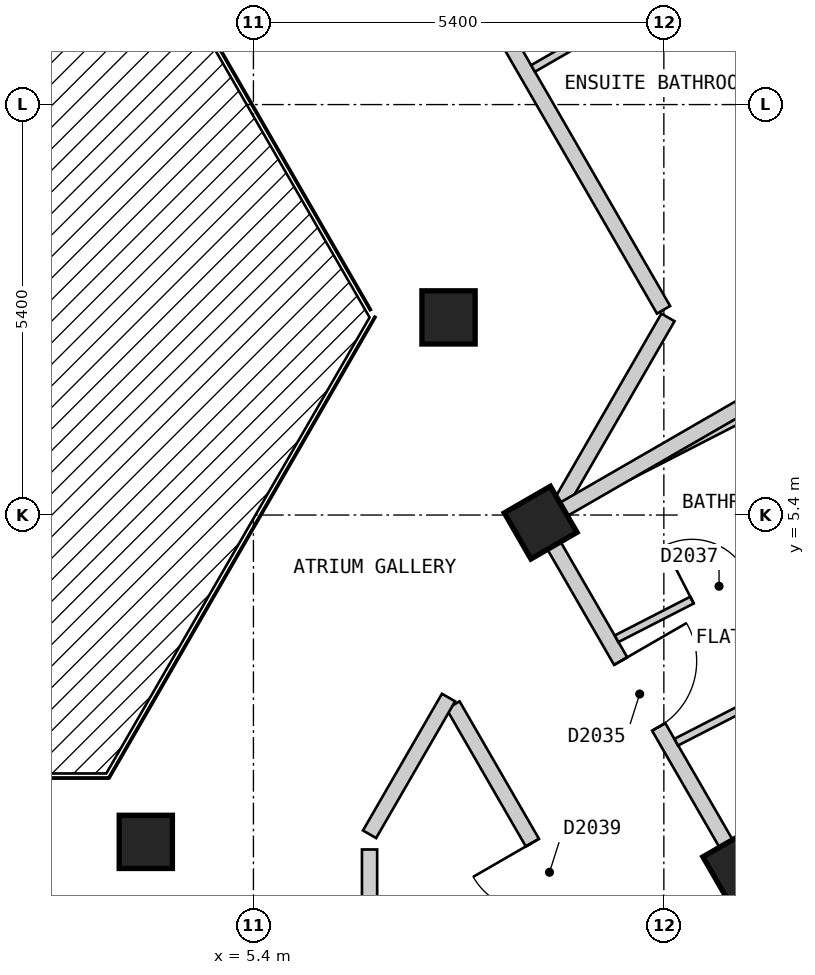
"""IFC4 building model, lengths in metres.
Left out: names, types, materials, properties, quantities, classifications, styles, units other than length and angle.
Written with IfcOpenShell. Run it as: python <this file> out.ifc"""

import sys

from ifc_helpers import new_model, si_unit, direction, frame, frame_2d, origin, origin_2d, place, context, subcontext, project, spatial, rectangle, extrude, element, fill, save


model = new_model("IFC4")
c1 = context("Model", 3, precision=1e-05, world=origin(), true_north=direction((0.0, 1.0)))
c2 = subcontext(c1, "Body", "Model", "MODEL_VIEW")
j1 = project(units=[si_unit("LENGTHUNIT", "METRE"), si_unit("PLANEANGLEUNIT", "RADIAN")], contexts=[c1])
p1 = place(None, origin())
s1 = spatial("IfcSite", under=j1, at=p1, CompositionType="ELEMENT")
p2 = place(p1, origin())
s2 = spatial("IfcBuilding", under=s1, at=p2, CompositionType="ELEMENT")
p3 = place(p2, frame((0.0, 0.0, 238.8)))
s3 = spatial("IfcBuildingStorey", under=s2, at=p3, CompositionType="ELEMENT", Elevation=238.8)
for number, where, z_axis, x_axis in (
    (1, (11.792, 0.775, 0.0), (0.0, 0.0, 1.0), (-0.5, 0.866, 0.0)),
    (2, (3.984, 1.1, 0.0), (0.0, 0.0, 1.0), (1.0, 0.0, 0.0)),
    (3, (9.179, 5.3, 0.0), (0.0, 0.0, 1.0), (-0.5, 0.866, 0.0)),
    (4, (7.967, 8.0, 0.0), (0.0, 0.0, 1.0), (1.0, 0.0, 0.0)),
):
    element("IfcColumn", number, at=place(p3, frame(where, z_axis=z_axis, x_axis=x_axis)), inside=s3, PredefinedType="COLUMN", context=c2, shape_type="SweptSolid", body=[
        extrude(rectangle(XDim=0.7, YDim=0.7, at=origin_2d()), origin(), (0.0, 0.0, 1.0), 3.0),
    ])
p4 = place(p3, frame((8.026, 2.899, 0.0), z_axis=(0.0, 0.0, 1.0), x_axis=(0.499986018985, -0.866033475577, 0.0)))
e5 = element("IfcWall", 5, at=p4, inside=s3, PredefinedType="PARTITIONING", context=c2, shape_type="SweptSolid", body=[
    extrude(rectangle(XDim=5.078, YDim=0.2, at=frame_2d((2.539, 0.0))), origin(), (0.0, 0.0, 1.0), 2.7),
])
p5 = place(p4, frame((2.089, 0.0, 0.0)))
e6 = element("IfcOpeningElement", 6, at=p5, cuts=e5, PredefinedType="OPENING", context=c2, shape_type="SweptSolid", body=[
    extrude(rectangle(XDim=0.9, YDim=2.1, at=frame_2d((0.45, 1.05))), frame((0.0, 0.11, 0.0), z_axis=(0.0, -1.0, 0.0), x_axis=(1.0, 0.0, 0.0)), (0.0, 0.0, 1.0), 0.22),
])
p6 = place(p3, frame((9.238, 5.2, 0.0), z_axis=(0.0, 0.0, 1.0), x_axis=(0.500025705601, -0.86601056214, 0.0)))
e7 = element("IfcWall", 7, at=p6, inside=s3, PredefinedType="PARTITIONING", context=c2, shape_type="SweptSolid", body=[
    extrude(rectangle(XDim=7.735, YDim=0.2, at=frame_2d((3.868, 0.0))), origin(), (0.0, 0.0, 1.0), 2.7),
])
p7 = place(p6, frame((6.705, 0.0, 0.0)))
e8 = element("IfcOpeningElement", 8, at=p7, cuts=e7, PredefinedType="OPENING", context=c2, shape_type="SweptSolid", body=[
    extrude(rectangle(XDim=1.0, YDim=2.1, at=frame_2d((0.5, 1.05))), frame((0.0, 0.11, 0.0), z_axis=(0.0, -1.0, 0.0), x_axis=(1.0, 0.0, 0.0)), (0.0, 0.0, 1.0), 0.22),
])
p8 = place(p6, frame((1.988, 0.0, 0.0)))
e9 = element("IfcOpeningElement", 9, at=p8, cuts=e7, PredefinedType="OPENING", context=c2, shape_type="SweptSolid", body=[
    extrude(rectangle(XDim=1.0, YDim=2.1, at=frame_2d((0.5, 1.05))), frame((0.0, 0.11, 0.0), z_axis=(0.0, -1.0, 0.0), x_axis=(1.0, 0.0, 0.0)), (0.0, 0.0, 1.0), 0.22),
])
p9 = place(p3, frame((5.485, 17.3, 0.0), z_axis=(0.0, 0.0, 1.0), x_axis=(0.499943285704, -0.866058145322, 0.0)))
e10 = element("IfcWall", 10, at=p9, inside=s3, PredefinedType="PARTITIONING", context=c2, shape_type="SweptSolid", body=[
    extrude(rectangle(XDim=10.623, YDim=0.2, at=frame_2d((5.312, 0.0))), origin(), (0.0, 0.0, 1.0), 2.7),
])
p10 = place(p3, frame((6.928, 1.0, 0.0), z_axis=(0.0, 0.0, 1.0), x_axis=(0.0, -1.0, 0.0)))
e11 = element("IfcWall", 11, at=p10, inside=s3, PredefinedType="PARTITIONING", context=c2, shape_type="SweptSolid", body=[
    extrude(rectangle(XDim=3.699, YDim=0.2, at=frame_2d((1.85, 0.0))), origin(), (0.0, 0.0, 1.0), 2.7),
])
p11 = place(p3, frame((6.928, 1.2, 0.0), z_axis=(0.0, 0.0, 1.0), x_axis=(0.500132712588, 0.865948768577, 0.0)))
e12 = element("IfcWall", 12, at=p11, inside=s3, PredefinedType="PARTITIONING", context=c2, shape_type="SweptSolid", body=[
    extrude(rectangle(XDim=2.078, YDim=0.2, at=frame_2d((1.039, 0.0))), origin(), (0.0, 0.0, 1.0), 2.7),
])
p12 = place(p3, frame((9.454, 5.574, 0.0), z_axis=(0.0, 0.0, 1.0), x_axis=(0.499795394297, 0.86614350072, 0.0)))
e13 = element("IfcWall", 13, at=p12, inside=s3, PredefinedType="PARTITIONING", context=c2, shape_type="SweptSolid", body=[
    extrude(rectangle(XDim=2.801, YDim=0.2, at=frame_2d((1.4, 0.0))), origin(), (0.0, 0.0, 1.0), 2.7),
])
p13 = place(p3, frame((11.441, 12.582, 0.0), z_axis=(0.0, 0.0, 1.0), x_axis=(0.488568218554, -0.872525699231, 0.0)))
e14 = element("IfcWall", 14, at=p13, inside=s3, PredefinedType="PARTITIONING", context=c2, shape_type="SweptSolid", body=[
    extrude(rectangle(XDim=5.076, YDim=0.1, at=frame_2d((2.538, 0.0))), origin(), (0.0, 0.0, 1.0), 2.7),
])
p14 = place(p13, frame((2.163, 0.0, 0.0)))
e15 = element("IfcOpeningElement", 15, at=p14, cuts=e14, PredefinedType="OPENING", context=c2, shape_type="SweptSolid", body=[
    extrude(rectangle(XDim=0.8, YDim=2.1, at=frame_2d((0.4, 1.05))), frame((0.0, 0.06, 0.0), z_axis=(0.0, -1.0, 0.0), x_axis=(1.0, 0.0, 0.0)), (0.0, 0.0, 1.0), 0.12),
])
p15 = place(p3, frame((10.178, 3.772, 0.0), z_axis=(0.0, 0.0, 1.0), x_axis=(0.889829844516, 0.456292502467, 0.0)))
e16 = element("IfcWall", 16, at=p15, inside=s3, PredefinedType="PARTITIONING", context=c2, shape_type="SweptSolid", body=[
    extrude(rectangle(XDim=3.079, YDim=0.1, at=frame_2d((1.54, 0.0))), origin(), (0.0, 0.0, 1.0), 2.7),
])
p16 = place(p15, frame((1.115, 0.0, 0.0)))
e17 = element("IfcOpeningElement", 17, at=p16, cuts=e16, PredefinedType="OPENING", context=c2, shape_type="SweptSolid", body=[
    extrude(rectangle(XDim=0.8, YDim=2.1, at=frame_2d((0.4, 1.05))), frame((0.0, 0.06, 0.0), z_axis=(0.0, -1.0, 0.0), x_axis=(1.0, 0.0, 0.0)), (0.0, 0.0, 1.0), 0.12),
])
p17 = place(p3, frame((10.963, 2.412, 0.0), z_axis=(0.0, 0.0, 1.0), x_axis=(0.890014850977, 0.455931535475, 0.0)))
e18 = element("IfcWall", 18, at=p17, inside=s3, PredefinedType="PARTITIONING", context=c2, shape_type="SweptSolid", body=[
    extrude(rectangle(XDim=3.051, YDim=0.1, at=frame_2d((1.525, 0.0))), origin(), (0.0, 0.0, 1.0), 2.7),
])
p18 = place(p17, frame((1.026, 0.0, 0.0)))
e19 = element("IfcOpeningElement", 19, at=p18, cuts=e18, PredefinedType="OPENING", context=c2, shape_type="SweptSolid", body=[
    extrude(rectangle(XDim=0.9, YDim=2.1, at=frame_2d((0.45, 1.05))), frame((0.0, 0.06, 0.0), z_axis=(0.0, -1.0, 0.0), x_axis=(1.0, 0.0, 0.0)), (0.0, 0.0, 1.0), 0.12),
])
p19 = place(p3, frame((9.457, 5.461, 0.0), z_axis=(0.0, 0.0, 1.0), x_axis=(0.889888641814, 0.456177821874, 0.0)))
e20 = element("IfcWall", 20, at=p19, inside=s3, PredefinedType="PARTITIONING", context=c2, shape_type="SweptSolid", body=[
    extrude(rectangle(XDim=2.999, YDim=0.1, at=frame_2d((1.5, 0.0))), origin(), (0.0, 0.0, 1.0), 2.7),
])
p20 = place(p3, frame((9.079, 11.275, 0.0), z_axis=(0.0, 0.0, 1.0), x_axis=(0.866001485781, 0.500041424909, 0.0)))
e21 = element("IfcWall", 21, at=p20, inside=s3, PredefinedType="PARTITIONING", context=c2, shape_type="SweptSolid", body=[
    extrude(rectangle(XDim=7.2, YDim=0.1, at=frame_2d((3.6, 0.0))), origin(), (0.0, 0.0, 1.0), 2.7),
])
p21 = place(p20, frame((4.5, 0.0, 0.0)))
e22 = element("IfcOpeningElement", 22, at=p21, cuts=e21, PredefinedType="OPENING", context=c2, shape_type="SweptSolid", body=[
    extrude(rectangle(XDim=0.9, YDim=2.1, at=frame_2d((0.45, 1.05))), frame((0.0, 0.06, 0.0), z_axis=(0.0, -1.0, 0.0), x_axis=(1.0, 0.0, 0.0)), (0.0, 0.0, 1.0), 0.12),
])
p22 = place(p3, frame((9.354, 5.401, 0.0), z_axis=(0.0, 0.0, 1.0), x_axis=(0.866018411306, 0.500012111133, 0.0)))
e23 = element("IfcWall", 23, at=p22, inside=s3, PredefinedType="PARTITIONING", context=c2, shape_type="SweptSolid", body=[
    extrude(rectangle(XDim=9.898, YDim=0.2, at=frame_2d((4.949, 0.0))), origin(), (0.0, 0.0, 1.0), 2.7),
])
p23 = place(p8, origin())
e24 = element("IfcDoor", 24, at=p23, inside=s3, OperationType="SINGLE_SWING_LEFT", PredefinedType="DOOR", context=c2, shape_type="SweptSolid", body=[
    extrude(rectangle(XDim=1.0, YDim=2.1, at=frame_2d((0.5, 1.05))), frame((0.0, 0.025, 0.0), z_axis=(0.0, -1.0, 0.0), x_axis=(1.0, 0.0, 0.0)), (0.0, 0.0, 1.0), 0.05),
])
fill(e9, e24)
p24 = place(p16, origin())
e25 = element("IfcDoor", 25, at=p24, inside=s3, OperationType="SINGLE_SWING_LEFT", PredefinedType="DOOR", context=c2, shape_type="SweptSolid", body=[
    extrude(rectangle(XDim=0.8, YDim=2.1, at=frame_2d((0.4, 1.05))), frame((0.0, 0.025, 0.0), z_axis=(0.0, -1.0, 0.0), x_axis=(1.0, 0.0, 0.0)), (0.0, 0.0, 1.0), 0.05),
])
fill(e17, e25)
p25 = place(p5, origin())
e26 = element("IfcDoor", 26, at=p25, inside=s3, OperationType="SINGLE_SWING_LEFT", PredefinedType="DOOR", context=c2, shape_type="SweptSolid", body=[
    extrude(rectangle(XDim=0.9, YDim=2.1, at=frame_2d((0.45, 1.05))), frame((0.0, 0.025, 0.0), z_axis=(0.0, -1.0, 0.0), x_axis=(1.0, 0.0, 0.0)), (0.0, 0.0, 1.0), 0.05),
])
fill(e6, e26)
save(model, sys.argv[1])
